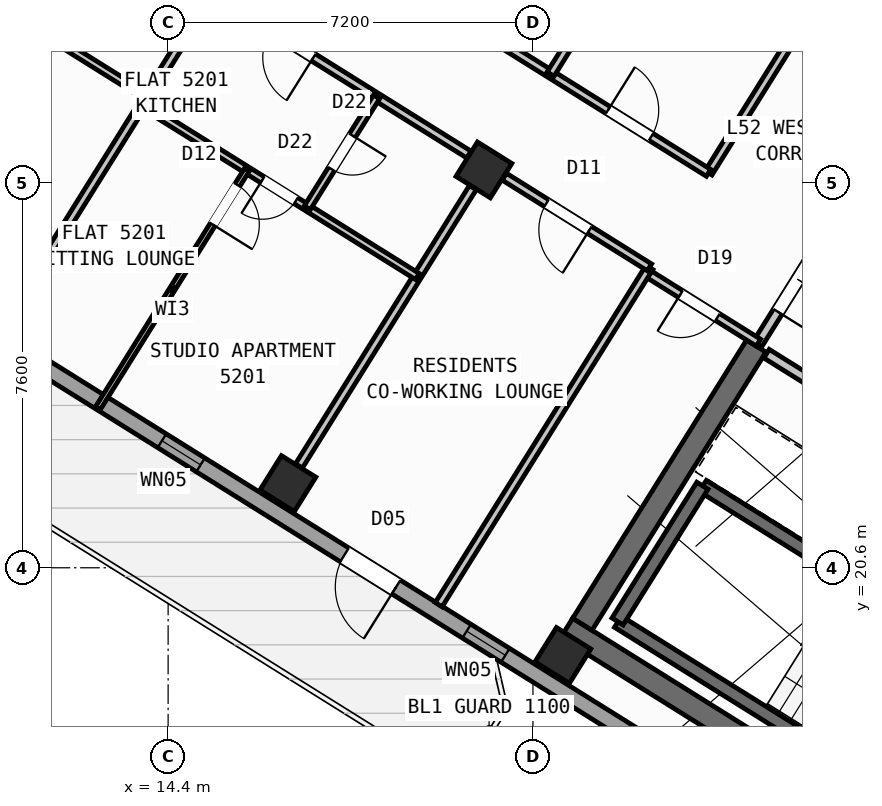
"""IFC4 building model, lengths in metres.
Left out: names, types, materials, properties, quantities, classifications, styles, units other than length and angle.
Written with IfcOpenShell. Run it as: python <this file> out.ifc"""

import sys

from ifc_helpers import new_model, si_unit, direction, frame, frame_2d, origin, origin_2d, place, context, subcontext, project, spatial, rectangle, hollow_rectangle, extrude, source, transform, mapped, element, fill, save


model = new_model("IFC4")
c1 = context("Model", 3, precision=1e-05, world=origin(), true_north=direction((0.0, 1.0)))
c2 = subcontext(c1, "Body", "Model", "MODEL_VIEW")
j1 = project(units=[si_unit("LENGTHUNIT", "METRE"), si_unit("PLANEANGLEUNIT", "RADIAN")], contexts=[c1])
p1 = place(None, origin())
s1 = spatial("IfcSite", under=j1, at=p1, CompositionType="ELEMENT")
p2 = place(p1, origin())
s2 = spatial("IfcBuilding", under=s1, at=p2, CompositionType="ELEMENT")
p3 = place(p2, frame((0.0, 0.0, 207.6)))
s3 = spatial("IfcBuildingStorey", under=s2, at=p3, CompositionType="ELEMENT", Elevation=207.6)
p4 = place(p3, frame((33.324, 12.503, 0.0), z_axis=(0.0, 0.0, 1.0), x_axis=(-0.848043529849, 0.529926571782, 0.0)))
e1 = element("IfcWall", 1, at=p4, inside=s3, PredefinedType="SHEAR", context=c2, shape_type="SweptSolid", body=[
    extrude(rectangle(XDim=13.04, YDim=0.45, at=frame_2d((6.52, 0.0))), origin(), (0.0, 0.0, 1.0), 3.35),
])
p5 = place(p3, frame((26.007, 24.976, 0.0), z_axis=(0.0, 0.0, 1.0), x_axis=(-0.529931155655, -0.848040665456, 0.0)))
e2 = element("IfcWall", 2, at=p5, inside=s3, PredefinedType="SHEAR", context=c2, shape_type="SweptSolid", body=[
    extrude(rectangle(XDim=6.475, YDim=0.45, at=frame_2d((3.238, 0.0))), origin(), (0.0, 0.0, 1.0), 3.35),
])
m1 = source(origin(), c2, "Body", "SweptSolid", [
    extrude(hollow_rectangle(XDim=0.8, YDim=0.8, WallThickness=0.032, at=origin_2d()), origin(), (0.0, 0.0, 1.0), 3.6),
])
for number, where, z_axis, x_axis in (
    (3, (22.191, 18.87, 0.0), (0.0, 0.0, 1.0), (-0.848, 0.53, 0.0)),
    (4, (20.632, 28.452, 0.0), (0.0, 0.0, 1.0), (-0.848, 0.53, 0.0)),
    (5, (16.764, 22.261, 0.0), (0.0, 0.0, 1.0), (-0.848, 0.53, 0.0)),
):
    element("IfcColumn", number, at=place(p3, frame(where, z_axis=z_axis, x_axis=x_axis)), inside=s3, PredefinedType="COLUMN", context=c2, shape_type="MappedRepresentation", body=[
        mapped(m1, transform((0.0, 0.0, 0.0), scale=1.0)),
    ])
p6 = place(p3, frame((31.76, 12.183, 0.0), z_axis=(0.0, 0.0, 1.0), x_axis=(-0.848047074256, 0.529920899612, 0.0)))
e6 = element("IfcWall", 6, at=p6, inside=s3, PredefinedType="STANDARD", context=c2, shape_type="SweptSolid", body=[
    extrude(rectangle(XDim=30.652, YDim=0.32, at=frame_2d((15.326, 0.0))), origin(), (0.0, 0.0, 1.0), 3.35),
])
p7 = place(p6, frame((15.166, 0.0, 0.0)))
e7 = element("IfcOpeningElement", 7, at=p7, cuts=e6, PredefinedType="OPENING", context=c2, shape_type="SweptSolid", body=[
    extrude(rectangle(XDim=1.2, YDim=2.15, at=frame_2d((0.6, 1.075))), frame((0.0, 0.17, 0.0), z_axis=(0.0, -1.0, 0.0), x_axis=(1.0, 0.0, 0.0)), (0.0, 0.0, 1.0), 0.34),
])
p8 = place(p6, frame((2.24, 0.0, 0.9)))
e8 = element("IfcOpeningElement", 8, at=p8, cuts=e6, PredefinedType="OPENING", context=c2, shape_type="SweptSolid", body=[
    extrude(rectangle(XDim=1.65, YDim=1.45, at=frame_2d((0.825, 0.725))), frame((0.0, 0.17, 0.0), z_axis=(0.0, -1.0, 0.0), x_axis=(1.0, 0.0, 0.0)), (0.0, 0.0, 1.0), 0.34),
])
p9 = place(p6, frame((7.469, 0.0, 0.9)))
e9 = element("IfcOpeningElement", 9, at=p9, cuts=e6, PredefinedType="OPENING", context=c2, shape_type="SweptSolid", body=[
    extrude(rectangle(XDim=1.65, YDim=1.45, at=frame_2d((0.825, 0.725))), frame((0.0, 0.17, 0.0), z_axis=(0.0, -1.0, 0.0), x_axis=(1.0, 0.0, 0.0)), (0.0, 0.0, 1.0), 0.34),
])
p10 = place(p6, frame((12.623, 0.0, 1.0)))
e10 = element("IfcOpeningElement", 10, at=p10, cuts=e6, PredefinedType="OPENING", context=c2, shape_type="SweptSolid", body=[
    extrude(rectangle(XDim=0.9, YDim=1.25, at=frame_2d((0.45, 0.625))), frame((0.0, 0.17, 0.0), z_axis=(0.0, -1.0, 0.0), x_axis=(1.0, 0.0, 0.0)), (0.0, 0.0, 1.0), 0.34),
])
p11 = place(p6, frame((19.715, 0.0, 1.0)))
e11 = element("IfcOpeningElement", 11, at=p11, cuts=e6, PredefinedType="OPENING", context=c2, shape_type="SweptSolid", body=[
    extrude(rectangle(XDim=0.9, YDim=1.25, at=frame_2d((0.45, 0.625))), frame((0.0, 0.17, 0.0), z_axis=(0.0, -1.0, 0.0), x_axis=(1.0, 0.0, 0.0)), (0.0, 0.0, 1.0), 0.34),
])
p12 = place(p6, frame((25.566, 0.0, 0.9)))
e12 = element("IfcOpeningElement", 12, at=p12, cuts=e6, PredefinedType="OPENING", context=c2, shape_type="SweptSolid", body=[
    extrude(rectangle(XDim=1.65, YDim=1.45, at=frame_2d((0.825, 0.725))), frame((0.0, 0.17, 0.0), z_axis=(0.0, -1.0, 0.0), x_axis=(1.0, 0.0, 0.0)), (0.0, 0.0, 1.0), 0.34),
])
p13 = place(p6, frame((28.896, 0.0, 1.0)))
e13 = element("IfcOpeningElement", 13, at=p13, cuts=e6, PredefinedType="OPENING", context=c2, shape_type="SweptSolid", body=[
    extrude(rectangle(XDim=0.9, YDim=1.25, at=frame_2d((0.45, 0.625))), frame((0.0, 0.17, 0.0), z_axis=(0.0, -1.0, 0.0), x_axis=(1.0, 0.0, 0.0)), (0.0, 0.0, 1.0), 0.34),
])
p14 = place(p3, frame((5.7, 28.71, 0.0), z_axis=(0.0, 0.0, 1.0), x_axis=(0.529923711467, 0.8480453172, 0.0)))
e14 = element("IfcWall", 14, at=p14, inside=s3, PredefinedType="STANDARD", context=c2, shape_type="SweptSolid", body=[
    extrude(rectangle(XDim=21.587, YDim=0.32, at=frame_2d((10.794, 0.0))), origin(), (0.0, 0.0, 1.0), 2.825),
])
p15 = place(p14, frame((2.184, 0.0, 0.9)))
e15 = element("IfcOpeningElement", 15, at=p15, cuts=e14, PredefinedType="OPENING", context=c2, shape_type="SweptSolid", body=[
    extrude(rectangle(XDim=1.65, YDim=1.45, at=frame_2d((0.825, 0.725))), frame((0.0, 0.17, 0.0), z_axis=(0.0, -1.0, 0.0), x_axis=(1.0, 0.0, 0.0)), (0.0, 0.0, 1.0), 0.34),
])
p16 = place(p14, frame((11.709, 0.0, 0.9)))
e16 = element("IfcOpeningElement", 16, at=p16, cuts=e14, PredefinedType="OPENING", context=c2, shape_type="SweptSolid", body=[
    extrude(rectangle(XDim=1.35, YDim=1.45, at=frame_2d((0.675, 0.725))), frame((0.0, 0.17, 0.0), z_axis=(0.0, -1.0, 0.0), x_axis=(1.0, 0.0, 0.0)), (0.0, 0.0, 1.0), 0.34),
])
p17 = place(p14, frame((17.181, 0.0, 0.95)))
e17 = element("IfcOpeningElement", 17, at=p17, cuts=e14, PredefinedType="OPENING", context=c2, shape_type="SweptSolid", body=[
    extrude(rectangle(XDim=1.95, YDim=1.35, at=frame_2d((0.975, 0.675))), frame((0.0, 0.17, 0.0), z_axis=(0.0, -1.0, 0.0), x_axis=(1.0, 0.0, 0.0)), (0.0, 0.0, 1.0), 0.34),
])
p18 = place(p3, frame((29.605, 15.581, 0.0), z_axis=(0.0, 0.0, 1.0), x_axis=(-0.848036911448, 0.529937163087, 0.0)))
e18 = element("IfcWall", 18, at=p18, inside=s3, PredefinedType="SHEAR", context=c2, shape_type="SweptSolid", body=[
    extrude(rectangle(XDim=7.46, YDim=0.26, at=frame_2d((3.73, 0.0))), origin(), (0.0, 0.0, 1.0), 3.35),
])
p19 = place(p3, frame((31.28, 18.261, 0.0), z_axis=(0.0, 0.0, 1.0), x_axis=(-0.848051618787, 0.529913626805, 0.0)))
e19 = element("IfcWall", 19, at=p19, inside=s3, PredefinedType="SHEAR", context=c2, shape_type="SweptSolid", body=[
    extrude(rectangle(XDim=7.46, YDim=0.26, at=frame_2d((3.73, 0.0))), origin(), (0.0, 0.0, 1.0), 3.35),
])
p20 = place(p19, frame((0.36, 0.0, 0.0)))
e20 = element("IfcOpeningElement", 20, at=p20, cuts=e19, PredefinedType="OPENING", context=c2, shape_type="SweptSolid", body=[
    extrude(rectangle(XDim=0.86, YDim=2.05, at=frame_2d((0.43, 1.025))), frame((0.0, 0.14, 0.0), z_axis=(0.0, -1.0, 0.0), x_axis=(1.0, 0.0, 0.0)), (0.0, 0.0, 1.0), 0.28),
])
p21 = place(p3, frame((24.945, 22.22, 0.0), z_axis=(0.0, 0.0, 1.0), x_axis=(-0.529908658664, -0.84805472316, 0.0)))
e21 = element("IfcWall", 21, at=p21, inside=s3, PredefinedType="SHEAR", context=c2, shape_type="SweptSolid", body=[
    extrude(rectangle(XDim=3.16, YDim=0.26, at=frame_2d((1.58, 0.0))), origin(), (0.0, 0.0, 1.0), 3.35),
])
p22 = place(p3, frame((31.525, 21.504, 0.0), z_axis=(0.0, 0.0, 1.0), x_axis=(-0.848042066329, 0.529928913853, 0.0)))
e22 = element("IfcWall", 22, at=p22, inside=s3, PredefinedType="STANDARD", context=c2, shape_type="SweptSolid", body=[
    extrude(rectangle(XDim=6.268, YDim=0.2, at=frame_2d((3.134, 0.0))), origin(), (0.0, 0.0, 1.0), 3.34),
])
p23 = place(p22, frame((4.4, 0.0, 0.0)))
e23 = element("IfcOpeningElement", 23, at=p23, cuts=e22, PredefinedType="OPENING", context=c2, shape_type="SweptSolid", body=[
    extrude(rectangle(XDim=0.86, YDim=2.05, at=frame_2d((0.43, 1.025))), frame((0.0, 0.11, 0.0), z_axis=(0.0, -1.0, 0.0), x_axis=(1.0, 0.0, 0.0)), (0.0, 0.0, 1.0), 0.22),
])
p24 = place(p22, frame((1.45, 0.0, 0.0)))
e24 = element("IfcOpeningElement", 24, at=p24, cuts=e22, PredefinedType="OPENING", context=c2, shape_type="SweptSolid", body=[
    extrude(rectangle(XDim=0.86, YDim=2.05, at=frame_2d((0.43, 1.025))), frame((0.0, 0.11, 0.0), z_axis=(0.0, -1.0, 0.0), x_axis=(1.0, 0.0, 0.0)), (0.0, 0.0, 1.0), 0.22),
])
p25 = place(p3, frame((27.596, 27.52, 0.0), z_axis=(0.0, 0.0, 1.0), x_axis=(-0.529865479138, -0.848081702443, 0.0)))
e25 = element("IfcWall", 25, at=p25, inside=s3, PredefinedType="STANDARD", context=c2, shape_type="SweptSolid", body=[
    extrude(rectangle(XDim=2.96, YDim=0.2, at=frame_2d((1.48, 0.0))), origin(), (0.0, 0.0, 1.0), 3.34),
])
p26 = place(p25, frame((0.7, 0.0, 0.0)))
e26 = element("IfcOpeningElement", 26, at=p26, cuts=e25, PredefinedType="OPENING", context=c2, shape_type="SweptSolid", body=[
    extrude(rectangle(XDim=1.5, YDim=2.15, at=frame_2d((0.75, 1.075))), frame((0.0, 0.11, 0.0), z_axis=(0.0, -1.0, 0.0), x_axis=(1.0, 0.0, 0.0)), (0.0, 0.0, 1.0), 0.22),
])
p27 = place(p3, frame((26.049, 25.044, 0.0), z_axis=(0.0, 0.0, 1.0), x_axis=(-0.848050851465, 0.529914854792, 0.0)))
e27 = element("IfcWall", 27, at=p27, inside=s3, PredefinedType="PARTITIONING", context=c2, shape_type="SweptSolid", body=[
    extrude(rectangle(XDim=2.61, YDim=0.16, at=frame_2d((1.305, 0.0))), origin(), (0.0, 0.0, 1.0), 2.825),
])
p28 = place(p27, frame((0.95, 0.0, 0.0)))
e28 = element("IfcOpeningElement", 28, at=p28, cuts=e27, PredefinedType="OPENING", context=c2, shape_type="SweptSolid", body=[
    extrude(rectangle(XDim=0.86, YDim=2.05, at=frame_2d((0.43, 1.025))), frame((0.0, 0.09, 0.0), z_axis=(0.0, -1.0, 0.0), x_axis=(1.0, 0.0, 0.0)), (0.0, 0.0, 1.0), 0.18),
])
p29 = place(p3, frame((31.239, 38.274, 0.0), z_axis=(0.0, 0.0, 1.0), x_axis=(-0.529925472745, -0.848044216616, 0.0)))
e29 = element("IfcWall", 29, at=p29, inside=s3, PredefinedType="PARTITIONING", context=c2, shape_type="SweptSolid", body=[
    extrude(rectangle(XDim=11.65, YDim=0.16, at=frame_2d((5.825, 0.0))), origin(), (0.0, 0.0, 1.0), 3.34),
])
p30 = place(p3, frame((23.899, 26.529, 0.0), z_axis=(0.0, 0.0, 1.0), x_axis=(-0.529920662441, -0.848047222457, 0.0)))
e30 = element("IfcWall", 30, at=p30, inside=s3, PredefinedType="PARTITIONING", context=c2, shape_type="SweptSolid", body=[
    extrude(rectangle(XDim=7.85, YDim=0.16, at=frame_2d((3.925, 0.0))), origin(), (0.0, 0.0, 1.0), 3.34),
])
p31 = place(p3, frame((25.065, 28.394, 0.0), z_axis=(0.0, 0.0, 1.0), x_axis=(-0.848048310262, 0.529918921593, 0.0)))
e31 = element("IfcWall", 31, at=p31, inside=s3, PredefinedType="PARTITIONING", context=c2, shape_type="SweptSolid", body=[
    extrude(rectangle(XDim=16.73, YDim=0.16, at=frame_2d((8.365, 0.0))), origin(), (0.0, 0.0, 1.0), 3.34),
])
p32 = place(p31, frame((1.338, 0.0, 0.0)))
e32 = element("IfcOpeningElement", 32, at=p32, cuts=e31, PredefinedType="OPENING", context=c2, shape_type="SweptSolid", body=[
    extrude(rectangle(XDim=1.0, YDim=2.1, at=frame_2d((0.5, 1.05))), frame((0.0, 0.09, 0.0), z_axis=(0.0, -1.0, 0.0), x_axis=(1.0, 0.0, 0.0)), (0.0, 0.0, 1.0), 0.18),
])
p33 = place(p31, frame((5.265, 0.0, 0.0)))
e33 = element("IfcOpeningElement", 33, at=p33, cuts=e31, PredefinedType="OPENING", context=c2, shape_type="SweptSolid", body=[
    extrude(rectangle(XDim=1.0, YDim=2.1, at=frame_2d((0.5, 1.05))), frame((0.0, 0.09, 0.0), z_axis=(0.0, -1.0, 0.0), x_axis=(1.0, 0.0, 0.0)), (0.0, 0.0, 1.0), 0.18),
])
p34 = place(p31, frame((9.526, 0.0, 0.0)))
e34 = element("IfcOpeningElement", 34, at=p34, cuts=e31, PredefinedType="OPENING", context=c2, shape_type="SweptSolid", body=[
    extrude(rectangle(XDim=1.0, YDim=2.1, at=frame_2d((0.5, 1.05))), frame((0.0, 0.09, 0.0), z_axis=(0.0, -1.0, 0.0), x_axis=(1.0, 0.0, 0.0)), (0.0, 0.0, 1.0), 0.18),
])
p35 = place(p31, frame((13.954, 0.0, 0.0)))
e35 = element("IfcOpeningElement", 35, at=p35, cuts=e31, PredefinedType="OPENING", context=c2, shape_type="SweptSolid", body=[
    extrude(rectangle(XDim=1.0, YDim=2.1, at=frame_2d((0.5, 1.05))), frame((0.0, 0.09, 0.0), z_axis=(0.0, -1.0, 0.0), x_axis=(1.0, 0.0, 0.0)), (0.0, 0.0, 1.0), 0.18),
])
p36 = place(p3, frame((23.899, 26.529, 0.0), z_axis=(0.0, 0.0, 1.0), x_axis=(-0.848055143312, 0.529907986259, 0.0)))
e36 = element("IfcWall", 36, at=p36, inside=s3, PredefinedType="PARTITIONING", context=c2, shape_type="SweptSolid", body=[
    extrude(rectangle(XDim=3.378, YDim=0.16, at=frame_2d((1.689, 0.0))), origin(), (0.0, 0.0, 1.0), 2.825),
])
p37 = place(p36, frame((1.395, 0.0, 0.0)))
e37 = element("IfcOpeningElement", 37, at=p37, cuts=e36, PredefinedType="OPENING", context=c2, shape_type="SweptSolid", body=[
    extrude(rectangle(XDim=1.0, YDim=2.1, at=frame_2d((0.5, 1.05))), frame((0.0, 0.09, 0.0), z_axis=(0.0, -1.0, 0.0), x_axis=(1.0, 0.0, 0.0)), (0.0, 0.0, 1.0), 0.18),
])
p38 = place(p3, frame((20.336, 28.755, 0.0), z_axis=(0.0, 0.0, 1.0), x_axis=(-0.848049955116, 0.529916289265, 0.0)))
e38 = element("IfcWall", 38, at=p38, inside=s3, PredefinedType="PARTITIONING", context=c2, shape_type="SweptSolid", body=[
    extrude(rectangle(XDim=5.576, YDim=0.16, at=frame_2d((2.788, 0.0))), origin(), (0.0, 0.0, 1.0), 2.825),
])
p39 = place(p38, frame((3.618, 0.0, 0.0)))
e39 = element("IfcOpeningElement", 39, at=p39, cuts=e38, PredefinedType="OPENING", context=c2, shape_type="SweptSolid", body=[
    extrude(rectangle(XDim=1.0, YDim=2.1, at=frame_2d((0.5, 1.05))), frame((0.0, 0.09, 0.0), z_axis=(0.0, -1.0, 0.0), x_axis=(1.0, 0.0, 0.0)), (0.0, 0.0, 1.0), 0.18),
])
p40 = place(p3, frame((20.414, 28.103, 0.0), z_axis=(0.0, 0.0, 1.0), x_axis=(-0.529934553702, -0.848038542045, 0.0)))
e40 = element("IfcWall", 40, at=p40, inside=s3, PredefinedType="PARTITIONING", context=c2, shape_type="SweptSolid", body=[
    extrude(rectangle(XDim=6.476, YDim=0.16, at=frame_2d((3.238, 0.0))), origin(), (0.0, 0.0, 1.0), 2.825),
])
p41 = place(p3, frame((14.986, 31.494, 0.0), z_axis=(0.0, 0.0, 1.0), x_axis=(-0.529907440938, -0.848055484057, 0.0)))
e41 = element("IfcWall", 41, at=p41, inside=s3, PredefinedType="PARTITIONING", context=c2, shape_type="SweptSolid", body=[
    extrude(rectangle(XDim=6.476, YDim=0.16, at=frame_2d((3.238, 0.0))), origin(), (0.0, 0.0, 1.0), 2.825),
])
p42 = place(p3, frame((19.318, 26.349, 0.0), z_axis=(0.0, 0.0, 1.0), x_axis=(-0.848039019877, 0.529933789039, 0.0)))
e42 = element("IfcWall", 42, at=p42, inside=s3, PredefinedType="PLUMBINGWALL", context=c2, shape_type="SweptSolid", body=[
    extrude(rectangle(XDim=6.4, YDim=0.14, at=frame_2d((3.2, 0.0))), origin(), (0.0, 0.0, 1.0), 3.34),
])
p43 = place(p42, frame((2.824, 0.0, 0.0)))
e43 = element("IfcOpeningElement", 43, at=p43, cuts=e42, PredefinedType="OPENING", context=c2, shape_type="SweptSolid", body=[
    extrude(rectangle(XDim=0.78, YDim=2.05, at=frame_2d((0.39, 1.025))), frame((0.0, 0.08, 0.0), z_axis=(0.0, -1.0, 0.0), x_axis=(1.0, 0.0, 0.0)), (0.0, 0.0, 1.0), 0.16),
])
p44 = place(p3, frame((18.514, 29.894, 0.0), z_axis=(0.0, 0.0, 1.0), x_axis=(-0.529913878929, -0.848051461244, 0.0)))
e44 = element("IfcWall", 44, at=p44, inside=s3, PredefinedType="PLUMBINGWALL", context=c2, shape_type="SweptSolid", body=[
    extrude(rectangle(XDim=2.58, YDim=0.14, at=frame_2d((1.29, 0.0))), origin(), (0.0, 0.0, 1.0), 3.34),
])
p45 = place(p44, frame((0.9, 0.0, 0.0)))
e45 = element("IfcOpeningElement", 45, at=p45, cuts=e44, PredefinedType="OPENING", context=c2, shape_type="SweptSolid", body=[
    extrude(rectangle(XDim=0.78, YDim=2.05, at=frame_2d((0.39, 1.025))), frame((0.0, 0.08, 0.0), z_axis=(0.0, -1.0, 0.0), x_axis=(1.0, 0.0, 0.0)), (0.0, 0.0, 1.0), 0.16),
])
p46 = place(p3, frame((15.953, 28.452, 0.0), z_axis=(0.0, 0.0, 1.0), x_axis=(-0.529919714018, -0.848047815099, 0.0)))
e46 = element("IfcWall", 46, at=p46, inside=s3, PredefinedType="PARTITIONING", context=c2, shape_type="SweptSolid", body=[
    extrude(rectangle(XDim=5.54, YDim=0.11, at=frame_2d((2.77, 0.0))), origin(), (0.0, 0.0, 1.0), 3.34),
])
p47 = place(p46, frame((0.35, 0.0, 0.0)))
e47 = element("IfcOpeningElement", 47, at=p47, cuts=e46, PredefinedType="OPENING", context=c2, shape_type="SweptSolid", body=[
    extrude(rectangle(XDim=0.92, YDim=2.08, at=frame_2d((0.46, 1.04))), frame((0.0, 0.065, 0.0), z_axis=(0.0, -1.0, 0.0), x_axis=(1.0, 0.0, 0.0)), (0.0, 0.0, 1.0), 0.13),
])
p48 = place(p3, frame((12.188, 33.847, 0.0), z_axis=(0.0, 0.0, 1.0), x_axis=(-0.529917860021, -0.848048973604, 0.0)))
e48 = element("IfcWall", 48, at=p48, inside=s3, PredefinedType="PARTITIONING", context=c2, shape_type="SweptSolid", body=[
    extrude(rectangle(XDim=8.12, YDim=0.11, at=frame_2d((4.06, 0.0))), origin(), (0.0, 0.0, 1.0), 3.34),
])
p49 = place(p48, frame((0.76, 0.0, 0.0)))
e49 = element("IfcOpeningElement", 49, at=p49, cuts=e48, PredefinedType="OPENING", context=c2, shape_type="SweptSolid", body=[
    extrude(rectangle(XDim=0.78, YDim=2.05, at=frame_2d((0.39, 1.025))), frame((0.0, 0.065, 0.0), z_axis=(0.0, -1.0, 0.0), x_axis=(1.0, 0.0, 0.0)), (0.0, 0.0, 1.0), 0.13),
])
p50 = place(p48, frame((4.8, 0.0, 0.0)))
e50 = element("IfcOpeningElement", 50, at=p50, cuts=e48, PredefinedType="OPENING", context=c2, shape_type="SweptSolid", body=[
    extrude(rectangle(XDim=0.92, YDim=2.08, at=frame_2d((0.46, 1.04))), frame((0.0, 0.065, 0.0), z_axis=(0.0, -1.0, 0.0), x_axis=(1.0, 0.0, 0.0)), (0.0, 0.0, 1.0), 0.13),
])
p51 = place(p3, frame((13.986, 29.893, 0.0), z_axis=(0.0, 0.0, 1.0), x_axis=(-0.848051346257, 0.52991406295, 0.0)))
e51 = element("IfcWall", 51, at=p51, inside=s3, PredefinedType="PLUMBINGWALL", context=c2, shape_type="SweptSolid", body=[
    extrude(rectangle(XDim=3.62, YDim=0.14, at=frame_2d((1.81, 0.0))), origin(), (0.0, 0.0, 1.0), 3.34),
])
p52 = place(p3, frame((24.379, 34.233, 0.0), z_axis=(0.0, 0.0, 1.0), x_axis=(-0.529922402838, -0.84804613493, 0.0)))
e52 = element("IfcWall", 52, at=p52, inside=s3, PredefinedType="PARTITIONING", context=c2, shape_type="SweptSolid", body=[
    extrude(rectangle(XDim=4.588, YDim=0.16, at=frame_2d((2.294, 0.0))), origin(), (0.0, 0.0, 1.0), 2.825),
])
m2 = source(origin(), c2, "Body", "SweptSolid", [
    extrude(rectangle(XDim=1.2, YDim=2.15, at=frame_2d((0.6, 1.075))), frame((0.0, 0.025, 0.0), z_axis=(0.0, -1.0, 0.0), x_axis=(1.0, 0.0, 0.0)), (0.0, 0.0, 1.0), 0.05),
])
p53 = place(p7, origin())
e53 = element("IfcDoor", 53, at=p53, inside=s3, OperationType="SINGLE_SWING_LEFT", PredefinedType="DOOR", context=c2, shape_type="MappedRepresentation", body=[
    mapped(m2, transform((0.0, 0.0, 0.0), scale=1.0)),
])
fill(e7, e53)
m3 = source(origin(), c2, "Body", "SweptSolid", [
    extrude(rectangle(XDim=0.9, YDim=1.25, at=frame_2d((0.45, 0.625))), frame((0.0, 0.03, 0.0), z_axis=(0.0, -1.0, 0.0), x_axis=(1.0, 0.0, 0.0)), (0.0, 0.0, 1.0), 0.06),
])
p54 = place(p10, origin())
e54 = element("IfcWindow", 54, at=p54, inside=s3, PartitioningType="SINGLE_PANEL", PredefinedType="WINDOW", context=c2, shape_type="MappedRepresentation", body=[
    mapped(m3, transform((0.0, 0.0, 0.0), scale=1.0)),
])
fill(e10, e54)
p55 = place(p11, origin())
e55 = element("IfcWindow", 55, at=p55, inside=s3, PartitioningType="SINGLE_PANEL", PredefinedType="WINDOW", context=c2, shape_type="MappedRepresentation", body=[
    mapped(m3, transform((0.0, 0.0, 0.0), scale=1.0)),
])
fill(e11, e55)
m4 = source(origin(), c2, "Body", "SweptSolid", [
    extrude(rectangle(XDim=0.86, YDim=2.05, at=frame_2d((0.43, 1.025))), frame((0.0, 0.025, 0.0), z_axis=(0.0, -1.0, 0.0), x_axis=(1.0, 0.0, 0.0)), (0.0, 0.0, 1.0), 0.05),
])
p56 = place(p28, origin())
e56 = element("IfcDoor", 56, at=p56, inside=s3, OperationType="SINGLE_SWING_RIGHT", PredefinedType="DOOR", context=c2, shape_type="MappedRepresentation", body=[
    mapped(m4, transform((0.0, 0.0, 0.0), scale=1.0)),
])
fill(e28, e56)
m5 = source(origin(), c2, "Body", "SweptSolid", [
    extrude(rectangle(XDim=1.5, YDim=2.15, at=frame_2d((0.75, 1.075))), frame((0.0, 0.025, 0.0), z_axis=(0.0, -1.0, 0.0), x_axis=(1.0, 0.0, 0.0)), (0.0, 0.0, 1.0), 0.05),
])
p57 = place(p26, origin())
e57 = element("IfcDoor", 57, at=p57, inside=s3, OperationType="DOUBLE_DOOR_SINGLE_SWING", PredefinedType="DOOR", context=c2, shape_type="MappedRepresentation", body=[
    mapped(m5, transform((0.0, 0.0, 0.0), scale=1.0)),
])
fill(e26, e57)
m6 = source(origin(), c2, "Body", "SweptSolid", [
    extrude(rectangle(XDim=1.0, YDim=2.1, at=frame_2d((0.5, 1.05))), frame((0.0, 0.025, 0.0), z_axis=(0.0, -1.0, 0.0), x_axis=(1.0, 0.0, 0.0)), (0.0, 0.0, 1.0), 0.05),
])
p58 = place(p37, origin())
e58 = element("IfcDoor", 58, at=p58, inside=s3, OperationType="SINGLE_SWING_LEFT", PredefinedType="DOOR", context=c2, shape_type="MappedRepresentation", body=[
    mapped(m6, transform((0.0, 0.0, 0.0), scale=1.0)),
])
fill(e37, e58)
m7 = source(origin(), c2, "Body", "SweptSolid", [
    extrude(rectangle(XDim=0.92, YDim=2.08, at=frame_2d((0.46, 1.04))), frame((0.0, 0.025, 0.0), z_axis=(0.0, -1.0, 0.0), x_axis=(1.0, 0.0, 0.0)), (0.0, 0.0, 1.0), 0.05),
])
p59 = place(p47, origin())
e59 = element("IfcDoor", 59, at=p59, inside=s3, OperationType="SINGLE_SWING_RIGHT", PredefinedType="DOOR", context=c2, shape_type="MappedRepresentation", body=[
    mapped(m7, transform((0.0, 0.0, 0.0), scale=1.0)),
])
fill(e47, e59)
p60 = place(p39, origin())
e60 = element("IfcDoor", 60, at=p60, inside=s3, OperationType="SINGLE_SWING_LEFT", PredefinedType="DOOR", context=c2, shape_type="MappedRepresentation", body=[
    mapped(m6, transform((0.0, 0.0, 0.0), scale=1.0)),
])
fill(e39, e60)
m8 = source(origin(), c2, "Body", "SweptSolid", [
    extrude(rectangle(XDim=0.78, YDim=2.05, at=frame_2d((0.39, 1.025))), frame((0.0, 0.025, 0.0), z_axis=(0.0, -1.0, 0.0), x_axis=(1.0, 0.0, 0.0)), (0.0, 0.0, 1.0), 0.05),
])
p61 = place(p43, origin())
e61 = element("IfcDoor", 61, at=p61, inside=s3, OperationType="SINGLE_SWING_RIGHT", PredefinedType="DOOR", context=c2, shape_type="MappedRepresentation", body=[
    mapped(m8, transform((0.0, 0.0, 0.0), scale=1.0)),
])
fill(e43, e61)
p62 = place(p45, origin())
e62 = element("IfcDoor", 62, at=p62, inside=s3, OperationType="SINGLE_SWING_LEFT", PredefinedType="DOOR", context=c2, shape_type="MappedRepresentation", body=[
    mapped(m8, transform((0.0, 0.0, 0.0), scale=1.0)),
])
fill(e45, e62)
p63 = place(p32, frame((1.0, 0.0, 0.0), z_axis=(0.0, 0.0, 1.0), x_axis=(-1.0, 0.0, 0.0)))
e63 = element("IfcDoor", 63, at=p63, inside=s3, OperationType="SINGLE_SWING_LEFT", PredefinedType="DOOR", context=c2, shape_type="MappedRepresentation", body=[
    mapped(m6, transform((0.0, 0.0, 0.0), scale=1.0)),
])
fill(e32, e63)
save(model, sys.argv[1])
